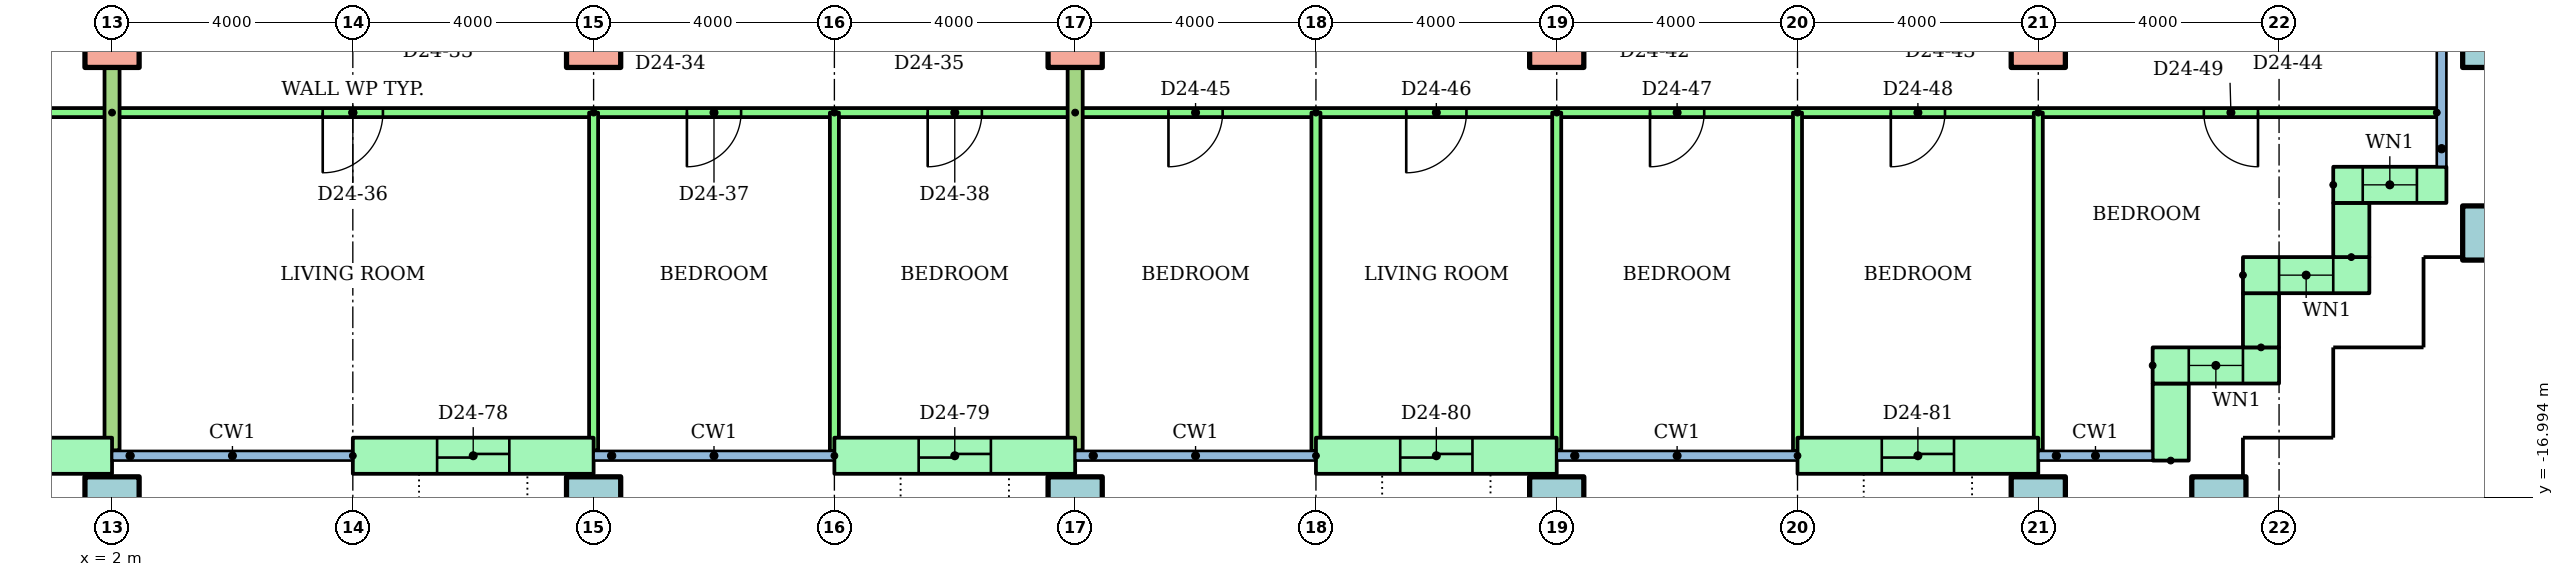
"""IFC4 building model, lengths in metres.
Left out: names, types, materials, properties, quantities, classifications, styles, units other than length and angle.
Written with IfcOpenShell. Run it as: python <this file> out.ifc"""

import sys

from ifc_helpers import new_model, si_unit, direction, frame, frame_2d, origin, origin_2d, place, context, subcontext, project, spatial, rectangle, hollow_rectangle, extrude, element, fill, save


model = new_model("IFC4")
c1 = context("Model", 3, precision=1e-05, world=origin(), true_north=direction((0.0, 1.0)))
c2 = subcontext(c1, "Body", "Model", "MODEL_VIEW")
j1 = project(units=[si_unit("LENGTHUNIT", "METRE"), si_unit("PLANEANGLEUNIT", "RADIAN")], contexts=[c1])
p1 = place(None, origin())
s1 = spatial("IfcSite", under=j1, at=p1, CompositionType="ELEMENT")
p2 = place(p1, origin())
s2 = spatial("IfcBuilding", under=s1, at=p2, CompositionType="ELEMENT")
p3 = place(p2, frame((0.0, 0.0, 93.5)))
s3 = spatial("IfcBuildingStorey", under=s2, at=p3, CompositionType="ELEMENT", Elevation=93.5)
for number, where in (
    (1, (2.0, -17.1, 0.0)),
    (2, (10.0, -17.1, 0.0)),
    (3, (18.0, -17.1, 0.0)),
    (4, (26.0, -17.1, 0.0)),
    (5, (34.0, -17.1, 0.0)),
    (6, (37.0, -17.1, 0.0)),
    (7, (41.5, -12.6, 0.0)),
):
    element("IfcColumn", number, at=place(p3, frame(where)), inside=s3, PredefinedType="COLUMN", context=c2, shape_type="SweptSolid", body=[
        extrude(hollow_rectangle(XDim=0.9, YDim=0.9, WallThickness=0.045, at=origin_2d()), origin(), (0.0, 0.0, 1.0), 3.2),
    ])
for number, where in (
    (8, (2.0, -9.4, 0.0)),
    (9, (10.0, -9.4, 0.0)),
    (10, (18.0, -9.4, 0.0)),
    (11, (26.0, -9.4, 0.0)),
    (12, (34.0, -9.4, 0.0)),
):
    element("IfcColumn", number, at=place(p3, frame(where)), inside=s3, PredefinedType="COLUMN", context=c2, shape_type="SweptSolid", body=[
        extrude(rectangle(XDim=0.9, YDim=0.9, at=origin_2d()), origin(), (0.0, 0.0, 1.0), 3.2),
    ])
p4 = place(p3, frame((41.5, -9.4, 0.0)))
e13 = element("IfcColumn", 13, at=p4, inside=s3, PredefinedType="COLUMN", context=c2, shape_type="SweptSolid", body=[
    extrude(hollow_rectangle(XDim=0.9, YDim=0.9, WallThickness=0.045, at=origin_2d()), origin(), (0.0, 0.0, 1.0), 3.2),
])
p5 = place(p3, frame((-2.0, -16.3, 0.0)))
e14 = element("IfcWall", 14, at=p5, inside=s3, PredefinedType="STANDARD", context=c2, shape_type="SweptSolid", body=[
    extrude(rectangle(XDim=4.0, YDim=0.6, at=frame_2d((2.0, 0.0))), origin(), (0.0, 0.0, 1.0), 2.92),
])
p6 = place(p5, frame((1.4, 0.0, 0.0)))
e15 = element("IfcOpeningElement", 15, at=p6, cuts=e14, PredefinedType="OPENING", context=c2, shape_type="SweptSolid", body=[
    extrude(rectangle(XDim=1.2, YDim=2.1, at=frame_2d((0.6, 1.05))), frame((0.0, 0.31, 0.0), z_axis=(0.0, -1.0, 0.0), x_axis=(1.0, 0.0, 0.0)), (0.0, 0.0, 1.0), 0.62),
])
p7 = place(p3, frame((6.0, -16.3, 0.0)))
e16 = element("IfcWall", 16, at=p7, inside=s3, PredefinedType="STANDARD", context=c2, shape_type="SweptSolid", body=[
    extrude(rectangle(XDim=4.0, YDim=0.6, at=frame_2d((2.0, 0.0))), origin(), (0.0, 0.0, 1.0), 2.92),
])
p8 = place(p7, frame((1.4, 0.0, 0.0)))
e17 = element("IfcOpeningElement", 17, at=p8, cuts=e16, PredefinedType="OPENING", context=c2, shape_type="SweptSolid", body=[
    extrude(rectangle(XDim=1.2, YDim=2.1, at=frame_2d((0.6, 1.05))), frame((0.0, 0.31, 0.0), z_axis=(0.0, -1.0, 0.0), x_axis=(1.0, 0.0, 0.0)), (0.0, 0.0, 1.0), 0.62),
])
p9 = place(p3, frame((14.0, -16.3, 0.0)))
e18 = element("IfcWall", 18, at=p9, inside=s3, PredefinedType="STANDARD", context=c2, shape_type="SweptSolid", body=[
    extrude(rectangle(XDim=4.0, YDim=0.6, at=frame_2d((2.0, 0.0))), origin(), (0.0, 0.0, 1.0), 2.92),
])
p10 = place(p9, frame((1.4, 0.0, 0.0)))
e19 = element("IfcOpeningElement", 19, at=p10, cuts=e18, PredefinedType="OPENING", context=c2, shape_type="SweptSolid", body=[
    extrude(rectangle(XDim=1.2, YDim=2.1, at=frame_2d((0.6, 1.05))), frame((0.0, 0.31, 0.0), z_axis=(0.0, -1.0, 0.0), x_axis=(1.0, 0.0, 0.0)), (0.0, 0.0, 1.0), 0.62),
])
p11 = place(p3, frame((22.0, -16.3, 0.0)))
e20 = element("IfcWall", 20, at=p11, inside=s3, PredefinedType="STANDARD", context=c2, shape_type="SweptSolid", body=[
    extrude(rectangle(XDim=4.0, YDim=0.6, at=frame_2d((2.0, 0.0))), origin(), (0.0, 0.0, 1.0), 2.92),
])
p12 = place(p11, frame((1.4, 0.0, 0.0)))
e21 = element("IfcOpeningElement", 21, at=p12, cuts=e20, PredefinedType="OPENING", context=c2, shape_type="SweptSolid", body=[
    extrude(rectangle(XDim=1.2, YDim=2.1, at=frame_2d((0.6, 1.05))), frame((0.0, 0.31, 0.0), z_axis=(0.0, -1.0, 0.0), x_axis=(1.0, 0.0, 0.0)), (0.0, 0.0, 1.0), 0.62),
])
p13 = place(p3, frame((30.0, -16.3, 0.0)))
e22 = element("IfcWall", 22, at=p13, inside=s3, PredefinedType="STANDARD", context=c2, shape_type="SweptSolid", body=[
    extrude(rectangle(XDim=4.0, YDim=0.6, at=frame_2d((2.0, 0.0))), origin(), (0.0, 0.0, 1.0), 2.92),
])
p14 = place(p13, frame((1.4, 0.0, 0.0)))
e23 = element("IfcOpeningElement", 23, at=p14, cuts=e22, PredefinedType="OPENING", context=c2, shape_type="SweptSolid", body=[
    extrude(rectangle(XDim=1.2, YDim=2.1, at=frame_2d((0.6, 1.05))), frame((0.0, 0.31, 0.0), z_axis=(0.0, -1.0, 0.0), x_axis=(1.0, 0.0, 0.0)), (0.0, 0.0, 1.0), 0.62),
])
p15 = place(p3, frame((36.2, -16.38, 0.0), z_axis=(0.0, 0.0, 1.0), x_axis=(0.0, 1.0, 0.0)))
e24 = element("IfcWall", 24, at=p15, inside=s3, PredefinedType="STANDARD", context=c2, shape_type="SweptSolid", body=[
    extrude(rectangle(XDim=1.28, YDim=0.6, at=frame_2d((0.64, 0.0))), origin(), (0.0, 0.0, 1.0), 2.92),
])
p16 = place(p3, frame((35.9, -14.8, 0.0)))
e25 = element("IfcWall", 25, at=p16, inside=s3, PredefinedType="STANDARD", context=c2, shape_type="SweptSolid", body=[
    extrude(rectangle(XDim=2.1, YDim=0.6, at=frame_2d((1.05, 0.0))), origin(), (0.0, 0.0, 1.0), 2.92),
])
p17 = place(p16, frame((0.6, 0.0, 0.9)))
e26 = element("IfcOpeningElement", 26, at=p17, cuts=e25, PredefinedType="OPENING", context=c2, shape_type="SweptSolid", body=[
    extrude(rectangle(XDim=0.9, YDim=1.5, at=frame_2d((0.45, 0.75))), frame((0.0, 0.31, 0.0), z_axis=(0.0, -1.0, 0.0), x_axis=(1.0, 0.0, 0.0)), (0.0, 0.0, 1.0), 0.62),
])
p18 = place(p3, frame((37.7, -14.5, 0.0), z_axis=(0.0, 0.0, 1.0), x_axis=(0.0, 1.0, 0.0)))
e27 = element("IfcWall", 27, at=p18, inside=s3, PredefinedType="STANDARD", context=c2, shape_type="SweptSolid", body=[
    extrude(rectangle(XDim=0.9, YDim=0.6, at=frame_2d((0.45, 0.0))), origin(), (0.0, 0.0, 1.0), 2.92),
])
p19 = place(p3, frame((37.4, -13.3, 0.0)))
e28 = element("IfcWall", 28, at=p19, inside=s3, PredefinedType="STANDARD", context=c2, shape_type="SweptSolid", body=[
    extrude(rectangle(XDim=2.1, YDim=0.6, at=frame_2d((1.05, 0.0))), origin(), (0.0, 0.0, 1.0), 2.92),
])
p20 = place(p19, frame((0.6, 0.0, 0.9)))
e29 = element("IfcOpeningElement", 29, at=p20, cuts=e28, PredefinedType="OPENING", context=c2, shape_type="SweptSolid", body=[
    extrude(rectangle(XDim=0.9, YDim=1.5, at=frame_2d((0.45, 0.75))), frame((0.0, 0.31, 0.0), z_axis=(0.0, -1.0, 0.0), x_axis=(1.0, 0.0, 0.0)), (0.0, 0.0, 1.0), 0.62),
])
p21 = place(p3, frame((39.2, -13.0, 0.0), z_axis=(0.0, 0.0, 1.0), x_axis=(0.0, 1.0, 0.0)))
e30 = element("IfcWall", 30, at=p21, inside=s3, PredefinedType="STANDARD", context=c2, shape_type="SweptSolid", body=[
    extrude(rectangle(XDim=0.9, YDim=0.6, at=frame_2d((0.45, 0.0))), origin(), (0.0, 0.0, 1.0), 2.92),
])
p22 = place(p3, frame((38.9, -11.8, 0.0)))
e31 = element("IfcWall", 31, at=p22, inside=s3, PredefinedType="STANDARD", context=c2, shape_type="SweptSolid", body=[
    extrude(rectangle(XDim=1.88, YDim=0.6, at=frame_2d((0.94, 0.0))), origin(), (0.0, 0.0, 1.0), 2.92),
])
p23 = place(p22, frame((0.49, 0.0, 0.9)))
e32 = element("IfcOpeningElement", 32, at=p23, cuts=e31, PredefinedType="OPENING", context=c2, shape_type="SweptSolid", body=[
    extrude(rectangle(XDim=0.9, YDim=1.5, at=frame_2d((0.45, 0.75))), frame((0.0, 0.31, 0.0), z_axis=(0.0, -1.0, 0.0), x_axis=(1.0, 0.0, 0.0)), (0.0, 0.0, 1.0), 0.62),
])
p24 = place(p3, frame((2.0, -10.6, 0.0), z_axis=(0.0, 0.0, 1.0), x_axis=(-1.0, 0.0, 0.0)))
e33 = element("IfcWall", 33, at=p24, inside=s3, PredefinedType="PARTITIONING", context=c2, shape_type="SweptSolid", body=[
    extrude(rectangle(XDim=16.0, YDim=0.15, at=frame_2d((8.0, 0.0))), origin(), (0.0, 0.0, 1.0), 2.4),
])
p25 = place(p24, frame((13.55, 0.0, 0.0)))
e34 = element("IfcOpeningElement", 34, at=p25, cuts=e33, PredefinedType="OPENING", context=c2, shape_type="SweptSolid", body=[
    extrude(rectangle(XDim=0.9, YDim=2.1, at=frame_2d((0.45, 1.05))), frame((0.0, 0.085, 0.0), z_axis=(0.0, -1.0, 0.0), x_axis=(1.0, 0.0, 0.0)), (0.0, 0.0, 1.0), 0.17),
])
p26 = place(p24, frame((9.55, 0.0, 0.0)))
e35 = element("IfcOpeningElement", 35, at=p26, cuts=e33, PredefinedType="OPENING", context=c2, shape_type="SweptSolid", body=[
    extrude(rectangle(XDim=0.9, YDim=2.1, at=frame_2d((0.45, 1.05))), frame((0.0, 0.085, 0.0), z_axis=(0.0, -1.0, 0.0), x_axis=(1.0, 0.0, 0.0)), (0.0, 0.0, 1.0), 0.17),
])
p27 = place(p24, frame((3.5, 0.0, 0.0)))
e36 = element("IfcOpeningElement", 36, at=p27, cuts=e33, PredefinedType="OPENING", context=c2, shape_type="SweptSolid", body=[
    extrude(rectangle(XDim=1.0, YDim=2.1, at=frame_2d((0.5, 1.05))), frame((0.0, 0.085, 0.0), z_axis=(0.0, -1.0, 0.0), x_axis=(1.0, 0.0, 0.0)), (0.0, 0.0, 1.0), 0.17),
])
p28 = place(p3, frame((18.0, -10.6, 0.0), z_axis=(0.0, 0.0, 1.0), x_axis=(-1.0, 0.0, 0.0)))
e37 = element("IfcWall", 37, at=p28, inside=s3, PredefinedType="PARTITIONING", context=c2, shape_type="SweptSolid", body=[
    extrude(rectangle(XDim=16.0, YDim=0.15, at=frame_2d((8.0, 0.0))), origin(), (0.0, 0.0, 1.0), 2.4),
])
p29 = place(p28, frame((11.5, 0.0, 0.0)))
e38 = element("IfcOpeningElement", 38, at=p29, cuts=e37, PredefinedType="OPENING", context=c2, shape_type="SweptSolid", body=[
    extrude(rectangle(XDim=1.0, YDim=2.1, at=frame_2d((0.5, 1.05))), frame((0.0, 0.085, 0.0), z_axis=(0.0, -1.0, 0.0), x_axis=(1.0, 0.0, 0.0)), (0.0, 0.0, 1.0), 0.17),
])
p30 = place(p28, frame((5.55, 0.0, 0.0)))
e39 = element("IfcOpeningElement", 39, at=p30, cuts=e37, PredefinedType="OPENING", context=c2, shape_type="SweptSolid", body=[
    extrude(rectangle(XDim=0.9, YDim=2.1, at=frame_2d((0.45, 1.05))), frame((0.0, 0.085, 0.0), z_axis=(0.0, -1.0, 0.0), x_axis=(1.0, 0.0, 0.0)), (0.0, 0.0, 1.0), 0.17),
])
p31 = place(p28, frame((1.55, 0.0, 0.0)))
e40 = element("IfcOpeningElement", 40, at=p31, cuts=e37, PredefinedType="OPENING", context=c2, shape_type="SweptSolid", body=[
    extrude(rectangle(XDim=0.9, YDim=2.1, at=frame_2d((0.45, 1.05))), frame((0.0, 0.085, 0.0), z_axis=(0.0, -1.0, 0.0), x_axis=(1.0, 0.0, 0.0)), (0.0, 0.0, 1.0), 0.17),
])
p32 = place(p3, frame((10.0, -10.6, 0.0), z_axis=(0.0, 0.0, 1.0), x_axis=(0.0, -1.0, 0.0)))
e41 = element("IfcWall", 41, at=p32, inside=s3, PredefinedType="PARTITIONING", context=c2, shape_type="SweptSolid", body=[
    extrude(rectangle(XDim=5.61, YDim=0.15, at=frame_2d((2.805, 0.0))), origin(), (0.0, 0.0, 1.0), 2.4),
])
p33 = place(p3, frame((14.0, -10.6, 0.0), z_axis=(0.0, 0.0, 1.0), x_axis=(0.0, -1.0, 0.0)))
e42 = element("IfcWall", 42, at=p33, inside=s3, PredefinedType="PARTITIONING", context=c2, shape_type="SweptSolid", body=[
    extrude(rectangle(XDim=5.621, YDim=0.15, at=frame_2d((2.811, 0.0))), origin(), (0.0, 0.0, 1.0), 2.4),
])
p34 = place(p3, frame((2.0, -1.4, 0.0), z_axis=(0.0, 0.0, 1.0), x_axis=(0.0, -1.0, 0.0)))
e43 = element("IfcWall", 43, at=p34, inside=s3, PredefinedType="PARTITIONING", context=c2, shape_type="SweptSolid", body=[
    extrude(rectangle(XDim=14.81, YDim=0.25, at=frame_2d((7.405, 0.0))), origin(), (0.0, 0.0, 1.0), 2.4),
])
p35 = place(p3, frame((40.62, -10.6, 0.0), z_axis=(0.0, 0.0, 1.0), x_axis=(-1.0, 0.0, 0.0)))
e44 = element("IfcWall", 44, at=p35, inside=s3, PredefinedType="PARTITIONING", context=c2, shape_type="SweptSolid", body=[
    extrude(rectangle(XDim=22.62, YDim=0.15, at=frame_2d((11.31, 0.0))), origin(), (0.0, 0.0, 1.0), 2.4),
])
p36 = place(p35, frame((20.17, 0.0, 0.0)))
e45 = element("IfcOpeningElement", 45, at=p36, cuts=e44, PredefinedType="OPENING", context=c2, shape_type="SweptSolid", body=[
    extrude(rectangle(XDim=0.9, YDim=2.1, at=frame_2d((0.45, 1.05))), frame((0.0, 0.085, 0.0), z_axis=(0.0, -1.0, 0.0), x_axis=(1.0, 0.0, 0.0)), (0.0, 0.0, 1.0), 0.17),
])
p37 = place(p35, frame((16.12, 0.0, 0.0)))
e46 = element("IfcOpeningElement", 46, at=p37, cuts=e44, PredefinedType="OPENING", context=c2, shape_type="SweptSolid", body=[
    extrude(rectangle(XDim=1.0, YDim=2.1, at=frame_2d((0.5, 1.05))), frame((0.0, 0.085, 0.0), z_axis=(0.0, -1.0, 0.0), x_axis=(1.0, 0.0, 0.0)), (0.0, 0.0, 1.0), 0.17),
])
p38 = place(p35, frame((12.17, 0.0, 0.0)))
e47 = element("IfcOpeningElement", 47, at=p38, cuts=e44, PredefinedType="OPENING", context=c2, shape_type="SweptSolid", body=[
    extrude(rectangle(XDim=0.9, YDim=2.1, at=frame_2d((0.45, 1.05))), frame((0.0, 0.085, 0.0), z_axis=(0.0, -1.0, 0.0), x_axis=(1.0, 0.0, 0.0)), (0.0, 0.0, 1.0), 0.17),
])
p39 = place(p35, frame((8.17, 0.0, 0.0)))
e48 = element("IfcOpeningElement", 48, at=p39, cuts=e44, PredefinedType="OPENING", context=c2, shape_type="SweptSolid", body=[
    extrude(rectangle(XDim=0.9, YDim=2.1, at=frame_2d((0.45, 1.05))), frame((0.0, 0.085, 0.0), z_axis=(0.0, -1.0, 0.0), x_axis=(1.0, 0.0, 0.0)), (0.0, 0.0, 1.0), 0.17),
])
p40 = place(p35, frame((2.97, 0.0, 0.0)))
e49 = element("IfcOpeningElement", 49, at=p40, cuts=e44, PredefinedType="OPENING", context=c2, shape_type="SweptSolid", body=[
    extrude(rectangle(XDim=0.9, YDim=2.1, at=frame_2d((0.45, 1.05))), frame((0.0, 0.085, 0.0), z_axis=(0.0, -1.0, 0.0), x_axis=(1.0, 0.0, 0.0)), (0.0, 0.0, 1.0), 0.17),
])
p41 = place(p3, frame((22.0, -10.6, 0.0), z_axis=(0.0, 0.0, 1.0), x_axis=(0.0, -1.0, 0.0)))
e50 = element("IfcWall", 50, at=p41, inside=s3, PredefinedType="PARTITIONING", context=c2, shape_type="SweptSolid", body=[
    extrude(rectangle(XDim=5.621, YDim=0.15, at=frame_2d((2.811, 0.0))), origin(), (0.0, 0.0, 1.0), 2.4),
])
p42 = place(p3, frame((26.0, -10.6, 0.0), z_axis=(0.0, 0.0, 1.0), x_axis=(0.0, -1.0, 0.0)))
e51 = element("IfcWall", 51, at=p42, inside=s3, PredefinedType="PARTITIONING", context=c2, shape_type="SweptSolid", body=[
    extrude(rectangle(XDim=5.61, YDim=0.15, at=frame_2d((2.805, 0.0))), origin(), (0.0, 0.0, 1.0), 2.4),
])
p43 = place(p3, frame((30.0, -10.6, 0.0), z_axis=(0.0, 0.0, 1.0), x_axis=(0.0, -1.0, 0.0)))
e52 = element("IfcWall", 52, at=p43, inside=s3, PredefinedType="PARTITIONING", context=c2, shape_type="SweptSolid", body=[
    extrude(rectangle(XDim=5.621, YDim=0.15, at=frame_2d((2.811, 0.0))), origin(), (0.0, 0.0, 1.0), 2.4),
])
p44 = place(p3, frame((34.0, -10.6, 0.0), z_axis=(0.0, 0.0, 1.0), x_axis=(0.0, -1.0, 0.0)))
e53 = element("IfcWall", 53, at=p44, inside=s3, PredefinedType="PARTITIONING", context=c2, shape_type="SweptSolid", body=[
    extrude(rectangle(XDim=5.61, YDim=0.15, at=frame_2d((2.805, 0.0))), origin(), (0.0, 0.0, 1.0), 2.4),
])
p45 = place(p3, frame((18.0, -1.4, 0.0), z_axis=(0.0, 0.0, 1.0), x_axis=(0.0, -1.0, 0.0)))
e54 = element("IfcWall", 54, at=p45, inside=s3, PredefinedType="PARTITIONING", context=c2, shape_type="SweptSolid", body=[
    extrude(rectangle(XDim=14.81, YDim=0.25, at=frame_2d((7.405, 0.0))), origin(), (0.0, 0.0, 1.0), 2.4),
])
p46 = place(p17, origin())
e55 = element("IfcWindow", 55, at=p46, inside=s3, PartitioningType="SINGLE_PANEL", PredefinedType="WINDOW", context=c2, shape_type="SweptSolid", body=[
    extrude(rectangle(XDim=0.9, YDim=1.5, at=frame_2d((0.45, 0.75))), frame((0.0, 0.03, 0.0), z_axis=(0.0, -1.0, 0.0), x_axis=(1.0, 0.0, 0.0)), (0.0, 0.0, 1.0), 0.06),
])
fill(e26, e55)
p47 = place(p20, origin())
e56 = element("IfcWindow", 56, at=p47, inside=s3, PartitioningType="SINGLE_PANEL", PredefinedType="WINDOW", context=c2, shape_type="SweptSolid", body=[
    extrude(rectangle(XDim=0.9, YDim=1.5, at=frame_2d((0.45, 0.75))), frame((0.0, 0.03, 0.0), z_axis=(0.0, -1.0, 0.0), x_axis=(1.0, 0.0, 0.0)), (0.0, 0.0, 1.0), 0.06),
])
fill(e29, e56)
p48 = place(p23, origin())
e57 = element("IfcWindow", 57, at=p48, inside=s3, PartitioningType="SINGLE_PANEL", PredefinedType="WINDOW", context=c2, shape_type="SweptSolid", body=[
    extrude(rectangle(XDim=0.9, YDim=1.5, at=frame_2d((0.45, 0.75))), frame((0.0, 0.03, 0.0), z_axis=(0.0, -1.0, 0.0), x_axis=(1.0, 0.0, 0.0)), (0.0, 0.0, 1.0), 0.06),
])
fill(e32, e57)
p49 = place(p29, origin())
e58 = element("IfcDoor", 58, at=p49, inside=s3, OperationType="SINGLE_SWING_RIGHT", PredefinedType="DOOR", context=c2, shape_type="SweptSolid", body=[
    extrude(rectangle(XDim=1.0, YDim=2.1, at=frame_2d((0.5, 1.05))), frame((0.0, 0.025, 0.0), z_axis=(0.0, -1.0, 0.0), x_axis=(1.0, 0.0, 0.0)), (0.0, 0.0, 1.0), 0.05),
])
fill(e38, e58)
p50 = place(p30, origin())
e59 = element("IfcDoor", 59, at=p50, inside=s3, OperationType="SINGLE_SWING_RIGHT", PredefinedType="DOOR", context=c2, shape_type="SweptSolid", body=[
    extrude(rectangle(XDim=0.9, YDim=2.1, at=frame_2d((0.45, 1.05))), frame((0.0, 0.025, 0.0), z_axis=(0.0, -1.0, 0.0), x_axis=(1.0, 0.0, 0.0)), (0.0, 0.0, 1.0), 0.05),
])
fill(e39, e59)
p51 = place(p31, origin())
e60 = element("IfcDoor", 60, at=p51, inside=s3, OperationType="SINGLE_SWING_RIGHT", PredefinedType="DOOR", context=c2, shape_type="SweptSolid", body=[
    extrude(rectangle(XDim=0.9, YDim=2.1, at=frame_2d((0.45, 1.05))), frame((0.0, 0.025, 0.0), z_axis=(0.0, -1.0, 0.0), x_axis=(1.0, 0.0, 0.0)), (0.0, 0.0, 1.0), 0.05),
])
fill(e40, e60)
p52 = place(p36, origin())
e61 = element("IfcDoor", 61, at=p52, inside=s3, OperationType="SINGLE_SWING_RIGHT", PredefinedType="DOOR", context=c2, shape_type="SweptSolid", body=[
    extrude(rectangle(XDim=0.9, YDim=2.1, at=frame_2d((0.45, 1.05))), frame((0.0, 0.025, 0.0), z_axis=(0.0, -1.0, 0.0), x_axis=(1.0, 0.0, 0.0)), (0.0, 0.0, 1.0), 0.05),
])
fill(e45, e61)
p53 = place(p37, origin())
e62 = element("IfcDoor", 62, at=p53, inside=s3, OperationType="SINGLE_SWING_RIGHT", PredefinedType="DOOR", context=c2, shape_type="SweptSolid", body=[
    extrude(rectangle(XDim=1.0, YDim=2.1, at=frame_2d((0.5, 1.05))), frame((0.0, 0.025, 0.0), z_axis=(0.0, -1.0, 0.0), x_axis=(1.0, 0.0, 0.0)), (0.0, 0.0, 1.0), 0.05),
])
fill(e46, e62)
p54 = place(p38, origin())
e63 = element("IfcDoor", 63, at=p54, inside=s3, OperationType="SINGLE_SWING_RIGHT", PredefinedType="DOOR", context=c2, shape_type="SweptSolid", body=[
    extrude(rectangle(XDim=0.9, YDim=2.1, at=frame_2d((0.45, 1.05))), frame((0.0, 0.025, 0.0), z_axis=(0.0, -1.0, 0.0), x_axis=(1.0, 0.0, 0.0)), (0.0, 0.0, 1.0), 0.05),
])
fill(e47, e63)
p55 = place(p39, origin())
e64 = element("IfcDoor", 64, at=p55, inside=s3, OperationType="SINGLE_SWING_RIGHT", PredefinedType="DOOR", context=c2, shape_type="SweptSolid", body=[
    extrude(rectangle(XDim=0.9, YDim=2.1, at=frame_2d((0.45, 1.05))), frame((0.0, 0.025, 0.0), z_axis=(0.0, -1.0, 0.0), x_axis=(1.0, 0.0, 0.0)), (0.0, 0.0, 1.0), 0.05),
])
fill(e48, e64)
p56 = place(p40, origin())
e65 = element("IfcDoor", 65, at=p56, inside=s3, OperationType="SINGLE_SWING_LEFT", PredefinedType="DOOR", context=c2, shape_type="SweptSolid", body=[
    extrude(rectangle(XDim=0.9, YDim=2.1, at=frame_2d((0.45, 1.05))), frame((0.0, 0.025, 0.0), z_axis=(0.0, -1.0, 0.0), x_axis=(1.0, 0.0, 0.0)), (0.0, 0.0, 1.0), 0.05),
])
fill(e49, e65)
p57 = place(p8, origin())
e66 = element("IfcDoor", 66, at=p57, inside=s3, OperationType="SLIDING_TO_LEFT", PredefinedType="DOOR", context=c2, shape_type="SweptSolid", body=[
    extrude(rectangle(XDim=1.2, YDim=2.1, at=frame_2d((0.6, 1.05))), frame((0.0, 0.025, 0.0), z_axis=(0.0, -1.0, 0.0), x_axis=(1.0, 0.0, 0.0)), (0.0, 0.0, 1.0), 0.05),
])
fill(e17, e66)
p58 = place(p10, origin())
e67 = element("IfcDoor", 67, at=p58, inside=s3, OperationType="SLIDING_TO_LEFT", PredefinedType="DOOR", context=c2, shape_type="SweptSolid", body=[
    extrude(rectangle(XDim=1.2, YDim=2.1, at=frame_2d((0.6, 1.05))), frame((0.0, 0.025, 0.0), z_axis=(0.0, -1.0, 0.0), x_axis=(1.0, 0.0, 0.0)), (0.0, 0.0, 1.0), 0.05),
])
fill(e19, e67)
p59 = place(p12, origin())
e68 = element("IfcDoor", 68, at=p59, inside=s3, OperationType="SLIDING_TO_LEFT", PredefinedType="DOOR", context=c2, shape_type="SweptSolid", body=[
    extrude(rectangle(XDim=1.2, YDim=2.1, at=frame_2d((0.6, 1.05))), frame((0.0, 0.025, 0.0), z_axis=(0.0, -1.0, 0.0), x_axis=(1.0, 0.0, 0.0)), (0.0, 0.0, 1.0), 0.05),
])
fill(e21, e68)
p60 = place(p14, origin())
e69 = element("IfcDoor", 69, at=p60, inside=s3, OperationType="SLIDING_TO_LEFT", PredefinedType="DOOR", context=c2, shape_type="SweptSolid", body=[
    extrude(rectangle(XDim=1.2, YDim=2.1, at=frame_2d((0.6, 1.05))), frame((0.0, 0.025, 0.0), z_axis=(0.0, -1.0, 0.0), x_axis=(1.0, 0.0, 0.0)), (0.0, 0.0, 1.0), 0.05),
])
fill(e23, e69)
save(model, sys.argv[1])
